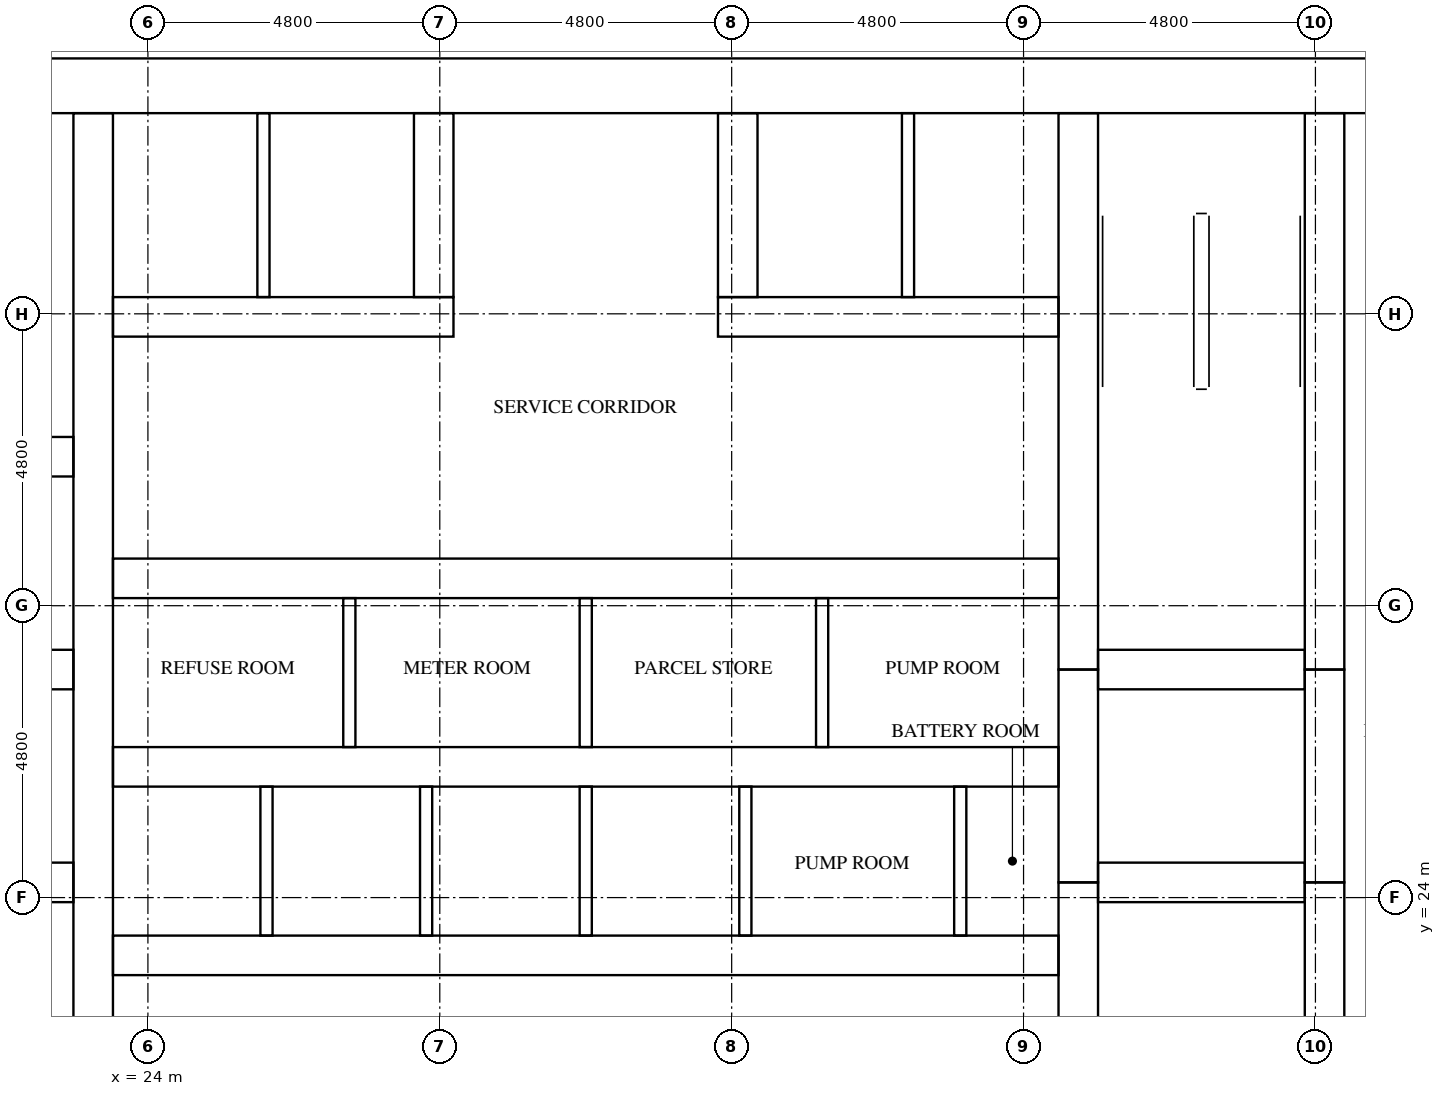
"""IFC4 building model, lengths in metres.
Left out: names, types, materials, properties, quantities, classifications, styles, units other than length and angle.
Written with IfcOpenShell. Run it as: python <this file> out.ifc"""

import sys

from ifc_helpers import new_model, si_unit, direction, frame, frame_2d, origin, place, context, subcontext, project, spatial, rectangle, extrude, element, fill, save


model = new_model("IFC4")
c1 = context("Model", 3, precision=1e-05, world=origin(), true_north=direction((0.0, 1.0)))
c2 = subcontext(c1, "Body", "Model", "MODEL_VIEW")
j1 = project(units=[si_unit("LENGTHUNIT", "METRE"), si_unit("PLANEANGLEUNIT", "RADIAN")], contexts=[c1])
p1 = place(None, origin())
s1 = spatial("IfcSite", under=j1, at=p1, CompositionType="ELEMENT")
p2 = place(p1, origin())
s2 = spatial("IfcBuilding", under=s1, at=p2, CompositionType="ELEMENT")
p3 = place(p2, frame((0.0, 0.0, 69.8)))
s3 = spatial("IfcBuildingStorey", under=s2, at=p3, CompositionType="ELEMENT", Elevation=69.8)
p4 = place(p3, frame((15.0, 37.35, 0.0), z_axis=(0.0, 0.0, 1.0), x_axis=(1.0, 0.0, 0.0)))
e1 = element("IfcWall", 1, at=p4, inside=s3, PredefinedType="SHEAR", context=c2, shape_type="SweptSolid", body=[
    extrude(rectangle(XDim=32.4, YDim=0.9, at=frame_2d((16.2, 0.0))), origin(), (0.0, 0.0, 1.0), 3.2),
])
p5 = place(p4, frame((15.3, 0.0, 0.0)))
e2 = element("IfcOpeningElement", 2, at=p5, cuts=e1, PredefinedType="OPENING", context=c2, shape_type="SweptSolid", body=[
    extrude(rectangle(XDim=1.8, YDim=2.1, at=frame_2d((0.9, 1.05))), frame((0.0, 0.46, 0.0), z_axis=(0.0, -1.0, 0.0), x_axis=(1.0, 0.0, 0.0)), (0.0, 0.0, 1.0), 0.92),
])
p6 = place(p4, frame((1.794, 0.0, 0.0)))
e3 = element("IfcOpeningElement", 3, at=p6, cuts=e1, PredefinedType="OPENING", context=c2, shape_type="SweptSolid", body=[
    extrude(rectangle(XDim=1.0, YDim=2.1, at=frame_2d((0.5, 1.05))), frame((0.0, 0.46, 0.0), z_axis=(0.0, -1.0, 0.0), x_axis=(1.0, 0.0, 0.0)), (0.0, 0.0, 1.0), 0.92),
])
p7 = place(p4, frame((5.331, 0.0, 0.0)))
e4 = element("IfcOpeningElement", 4, at=p7, cuts=e1, PredefinedType="OPENING", context=c2, shape_type="SweptSolid", body=[
    extrude(rectangle(XDim=1.0, YDim=2.1, at=frame_2d((0.5, 1.05))), frame((0.0, 0.46, 0.0), z_axis=(0.0, -1.0, 0.0), x_axis=(1.0, 0.0, 0.0)), (0.0, 0.0, 1.0), 0.92),
])
p8 = place(p3, frame((23.1, 15.9, 0.0), z_axis=(0.0, 0.0, 1.0), x_axis=(0.0, 1.0, 0.0)))
e5 = element("IfcWall", 5, at=p8, inside=s3, PredefinedType="SHEAR", context=c2, shape_type="SweptSolid", body=[
    extrude(rectangle(XDim=21.0, YDim=0.65, at=frame_2d((10.5, 0.0))), origin(), (0.0, 0.0, 1.0), 3.2),
])
p9 = place(p3, frame((39.3, 15.9, 0.0), z_axis=(0.0, 0.0, 1.0), x_axis=(0.0, 1.0, 0.0)))
e6 = element("IfcWall", 6, at=p9, inside=s3, PredefinedType="SHEAR", context=c2, shape_type="SweptSolid", body=[
    extrude(rectangle(XDim=8.35, YDim=0.65, at=frame_2d((4.175, 0.0))), origin(), (0.0, 0.0, 1.0), 3.2),
])
p10 = place(p3, frame((39.3, 24.25, 0.0), z_axis=(0.0, 0.0, 1.0), x_axis=(0.0, 1.0, 0.0)))
e7 = element("IfcWall", 7, at=p10, inside=s3, PredefinedType="SHEAR", context=c2, shape_type="SweptSolid", body=[
    extrude(rectangle(XDim=3.5, YDim=0.65, at=frame_2d((1.75, 0.0))), origin(), (0.0, 0.0, 1.0), 3.2),
])
p11 = place(p3, frame((39.3, 27.75, 0.0), z_axis=(0.0, 0.0, 1.0), x_axis=(0.0, 1.0, 0.0)))
e8 = element("IfcWall", 8, at=p11, inside=s3, PredefinedType="SHEAR", context=c2, shape_type="SweptSolid", body=[
    extrude(rectangle(XDim=9.15, YDim=0.65, at=frame_2d((4.575, 0.0))), origin(), (0.0, 0.0, 1.0), 3.2),
])
p12 = place(p3, frame((43.35, 15.9, 0.0), z_axis=(0.0, 0.0, 1.0), x_axis=(0.0, 1.0, 0.0)))
e9 = element("IfcWall", 9, at=p12, inside=s3, PredefinedType="SHEAR", context=c2, shape_type="SweptSolid", body=[
    extrude(rectangle(XDim=8.35, YDim=0.65, at=frame_2d((4.175, 0.0))), origin(), (0.0, 0.0, 1.0), 3.2),
])
p13 = place(p12, frame((0.3, 0.0, 0.0)))
e10 = element("IfcOpeningElement", 10, at=p13, cuts=e9, PredefinedType="OPENING", context=c2, shape_type="SweptSolid", body=[
    extrude(rectangle(XDim=1.2, YDim=2.1, at=frame_2d((0.6, 1.05))), frame((0.0, 0.335, 0.0), z_axis=(0.0, -1.0, 0.0), x_axis=(1.0, 0.0, 0.0)), (0.0, 0.0, 1.0), 0.67),
])
p14 = place(p3, frame((43.35, 24.25, 0.0), z_axis=(0.0, 0.0, 1.0), x_axis=(0.0, 1.0, 0.0)))
e11 = element("IfcWall", 11, at=p14, inside=s3, PredefinedType="SHEAR", context=c2, shape_type="SweptSolid", body=[
    extrude(rectangle(XDim=3.5, YDim=0.65, at=frame_2d((1.75, 0.0))), origin(), (0.0, 0.0, 1.0), 3.2),
])
p15 = place(p14, frame((1.2, 0.0, 0.0)))
e12 = element("IfcOpeningElement", 12, at=p15, cuts=e11, PredefinedType="OPENING", context=c2, shape_type="SweptSolid", body=[
    extrude(rectangle(XDim=1.1, YDim=2.1, at=frame_2d((0.55, 1.05))), frame((0.0, 0.335, 0.0), z_axis=(0.0, -1.0, 0.0), x_axis=(1.0, 0.0, 0.0)), (0.0, 0.0, 1.0), 0.67),
])
p16 = place(p3, frame((43.35, 27.75, 0.0), z_axis=(0.0, 0.0, 1.0), x_axis=(0.0, 1.0, 0.0)))
e13 = element("IfcWall", 13, at=p16, inside=s3, PredefinedType="SHEAR", context=c2, shape_type="SweptSolid", body=[
    extrude(rectangle(XDim=9.15, YDim=0.65, at=frame_2d((4.575, 0.0))), origin(), (0.0, 0.0, 1.0), 3.2),
])
p17 = place(p16, frame((7.65, 0.0, 0.0)))
e14 = element("IfcOpeningElement", 14, at=p17, cuts=e13, PredefinedType="OPENING", context=c2, shape_type="SweptSolid", body=[
    extrude(rectangle(XDim=1.2, YDim=2.1, at=frame_2d((0.6, 1.05))), frame((0.0, 0.335, 0.0), z_axis=(0.0, -1.0, 0.0), x_axis=(1.0, 0.0, 0.0)), (0.0, 0.0, 1.0), 0.67),
])
for number, where, z_axis, x_axis in (
    (15, (19.375, 24.25, 0.0), (0.0, 0.0, 1.0), (1.0, 0.0, 0.0)),
    (16, (19.375, 27.75, 0.0), (0.0, 0.0, 1.0), (1.0, 0.0, 0.0)),
):
    element("IfcWall", number, at=place(p3, frame(where, z_axis=z_axis, x_axis=x_axis)), inside=s3, PredefinedType="SHEAR", context=c2, shape_type="SweptSolid", body=[
        extrude(rectangle(XDim=3.4, YDim=0.65, at=frame_2d((1.7, 0.0))), origin(), (0.0, 0.0, 1.0), 3.2),
    ])
p18 = place(p3, frame((15.9, 31.25, 0.0), z_axis=(0.0, 0.0, 1.0), x_axis=(1.0, 0.0, 0.0)))
e17 = element("IfcWall", 17, at=p18, inside=s3, PredefinedType="SHEAR", context=c2, shape_type="SweptSolid", body=[
    extrude(rectangle(XDim=6.875, YDim=0.65, at=frame_2d((3.438, 0.0))), origin(), (0.0, 0.0, 1.0), 3.2),
])
for number, where, z_axis, x_axis in (
    (18, (39.625, 24.25, 0.0), (0.0, 0.0, 1.0), (1.0, 0.0, 0.0)),
    (19, (39.625, 27.75, 0.0), (0.0, 0.0, 1.0), (1.0, 0.0, 0.0)),
):
    element("IfcWall", number, at=place(p3, frame(where, z_axis=z_axis, x_axis=x_axis)), inside=s3, PredefinedType="SHEAR", context=c2, shape_type="SweptSolid", body=[
        extrude(rectangle(XDim=3.4, YDim=0.65, at=frame_2d((1.7, 0.0))), origin(), (0.0, 0.0, 1.0), 3.2),
    ])
p19 = place(p3, frame((23.425, 23.05, 0.0), z_axis=(0.0, 0.0, 1.0), x_axis=(1.0, 0.0, 0.0)))
e20 = element("IfcWall", 20, at=p19, inside=s3, PredefinedType="SHEAR", context=c2, shape_type="SweptSolid", body=[
    extrude(rectangle(XDim=15.55, YDim=0.65, at=frame_2d((7.775, 0.0))), origin(), (0.0, 0.0, 1.0), 3.2),
])
p20 = place(p19, frame((0.663, 0.0, 0.0)))
e21 = element("IfcOpeningElement", 21, at=p20, cuts=e20, PredefinedType="OPENING", context=c2, shape_type="SweptSolid", body=[
    extrude(rectangle(XDim=1.1, YDim=2.1, at=frame_2d((0.55, 1.05))), frame((0.0, 0.335, 0.0), z_axis=(0.0, -1.0, 0.0), x_axis=(1.0, 0.0, 0.0)), (0.0, 0.0, 1.0), 0.67),
])
p21 = place(p19, frame((3.288, 0.0, 0.0)))
e22 = element("IfcOpeningElement", 22, at=p21, cuts=e20, PredefinedType="OPENING", context=c2, shape_type="SweptSolid", body=[
    extrude(rectangle(XDim=1.1, YDim=2.1, at=frame_2d((0.55, 1.05))), frame((0.0, 0.335, 0.0), z_axis=(0.0, -1.0, 0.0), x_axis=(1.0, 0.0, 0.0)), (0.0, 0.0, 1.0), 0.67),
])
p22 = place(p19, frame((11.667, 0.0, 0.0)))
e23 = element("IfcOpeningElement", 23, at=p22, cuts=e20, PredefinedType="OPENING", context=c2, shape_type="SweptSolid", body=[
    extrude(rectangle(XDim=1.0, YDim=2.1, at=frame_2d((0.5, 1.05))), frame((0.0, 0.335, 0.0), z_axis=(0.0, -1.0, 0.0), x_axis=(1.0, 0.0, 0.0)), (0.0, 0.0, 1.0), 0.67),
])
p23 = place(p19, frame((14.292, 0.0, 0.0)))
e24 = element("IfcOpeningElement", 24, at=p23, cuts=e20, PredefinedType="OPENING", context=c2, shape_type="SweptSolid", body=[
    extrude(rectangle(XDim=1.0, YDim=2.1, at=frame_2d((0.5, 1.05))), frame((0.0, 0.335, 0.0), z_axis=(0.0, -1.0, 0.0), x_axis=(1.0, 0.0, 0.0)), (0.0, 0.0, 1.0), 0.67),
])
p24 = place(p3, frame((23.425, 26.15, 0.0), z_axis=(0.0, 0.0, 1.0), x_axis=(1.0, 0.0, 0.0)))
e25 = element("IfcWall", 25, at=p24, inside=s3, PredefinedType="SHEAR", context=c2, shape_type="SweptSolid", body=[
    extrude(rectangle(XDim=15.55, YDim=0.65, at=frame_2d((7.775, 0.0))), origin(), (0.0, 0.0, 1.0), 3.2),
])
p25 = place(p3, frame((23.425, 29.25, 0.0), z_axis=(0.0, 0.0, 1.0), x_axis=(1.0, 0.0, 0.0)))
e26 = element("IfcWall", 26, at=p25, inside=s3, PredefinedType="SHEAR", context=c2, shape_type="SweptSolid", body=[
    extrude(rectangle(XDim=15.55, YDim=0.65, at=frame_2d((7.775, 0.0))), origin(), (0.0, 0.0, 1.0), 3.2),
])
p26 = place(p25, frame((1.394, 0.0, 0.0)))
e27 = element("IfcOpeningElement", 27, at=p26, cuts=e26, PredefinedType="OPENING", context=c2, shape_type="SweptSolid", body=[
    extrude(rectangle(XDim=1.0, YDim=2.1, at=frame_2d((0.5, 1.05))), frame((0.0, 0.335, 0.0), z_axis=(0.0, -1.0, 0.0), x_axis=(1.0, 0.0, 0.0)), (0.0, 0.0, 1.0), 0.67),
])
p27 = place(p25, frame((5.331, 0.0, 0.0)))
e28 = element("IfcOpeningElement", 28, at=p27, cuts=e26, PredefinedType="OPENING", context=c2, shape_type="SweptSolid", body=[
    extrude(rectangle(XDim=1.0, YDim=2.1, at=frame_2d((0.5, 1.05))), frame((0.0, 0.335, 0.0), z_axis=(0.0, -1.0, 0.0), x_axis=(1.0, 0.0, 0.0)), (0.0, 0.0, 1.0), 0.67),
])
p28 = place(p25, frame((9.219, 0.0, 0.0)))
e29 = element("IfcOpeningElement", 29, at=p28, cuts=e26, PredefinedType="OPENING", context=c2, shape_type="SweptSolid", body=[
    extrude(rectangle(XDim=1.0, YDim=2.1, at=frame_2d((0.5, 1.05))), frame((0.0, 0.335, 0.0), z_axis=(0.0, -1.0, 0.0), x_axis=(1.0, 0.0, 0.0)), (0.0, 0.0, 1.0), 0.67),
])
p29 = place(p25, frame((13.156, 0.0, 0.0)))
e30 = element("IfcOpeningElement", 30, at=p29, cuts=e26, PredefinedType="OPENING", context=c2, shape_type="SweptSolid", body=[
    extrude(rectangle(XDim=1.0, YDim=2.1, at=frame_2d((0.5, 1.05))), frame((0.0, 0.335, 0.0), z_axis=(0.0, -1.0, 0.0), x_axis=(1.0, 0.0, 0.0)), (0.0, 0.0, 1.0), 0.67),
])
p30 = place(p3, frame((23.425, 33.55, 0.0), z_axis=(0.0, 0.0, 1.0), x_axis=(1.0, 0.0, 0.0)))
e31 = element("IfcWall", 31, at=p30, inside=s3, PredefinedType="SHEAR", context=c2, shape_type="SweptSolid", body=[
    extrude(rectangle(XDim=5.6, YDim=0.65, at=frame_2d((2.8, 0.0))), origin(), (0.0, 0.0, 1.0), 3.2),
])
p31 = place(p3, frame((33.375, 33.55, 0.0), z_axis=(0.0, 0.0, 1.0), x_axis=(1.0, 0.0, 0.0)))
e32 = element("IfcWall", 32, at=p31, inside=s3, PredefinedType="SHEAR", context=c2, shape_type="SweptSolid", body=[
    extrude(rectangle(XDim=5.6, YDim=0.65, at=frame_2d((2.8, 0.0))), origin(), (0.0, 0.0, 1.0), 3.2),
])
for number, where, z_axis, x_axis in (
    (33, (28.7, 33.875, 0.0), (0.0, 0.0, 1.0), (0.0, 1.0, 0.0)),
    (34, (33.7, 33.875, 0.0), (0.0, 0.0, 1.0), (0.0, 1.0, 0.0)),
):
    element("IfcWall", number, at=place(p3, frame(where, z_axis=z_axis, x_axis=x_axis)), inside=s3, PredefinedType="SHEAR", context=c2, shape_type="SweptSolid", body=[
        extrude(rectangle(XDim=3.025, YDim=0.65, at=frame_2d((1.512, 0.0))), origin(), (0.0, 0.0, 1.0), 3.2),
    ])
for number, where, z_axis, x_axis in (
    (35, (25.95, 23.375, 0.0), (0.0, 0.0, 1.0), (0.0, 1.0, 0.0)),
    (36, (28.575, 23.375, 0.0), (0.0, 0.0, 1.0), (0.0, 1.0, 0.0)),
    (37, (31.2, 23.375, 0.0), (0.0, 0.0, 1.0), (0.0, 1.0, 0.0)),
    (38, (33.825, 23.375, 0.0), (0.0, 0.0, 1.0), (0.0, 1.0, 0.0)),
):
    element("IfcWall", number, at=place(p3, frame(where, z_axis=z_axis, x_axis=x_axis)), inside=s3, PredefinedType="SOLIDWALL", context=c2, shape_type="SweptSolid", body=[
        extrude(rectangle(XDim=2.45, YDim=0.2, at=frame_2d((1.225, 0.0))), origin(), (0.0, 0.0, 1.0), 3.2),
    ])
for number, where, z_axis, x_axis in (
    (39, (25.9, 33.875, 0.0), (0.0, 0.0, 1.0), (0.0, 1.0, 0.0)),
    (40, (36.5, 33.875, 0.0), (0.0, 0.0, 1.0), (0.0, 1.0, 0.0)),
):
    element("IfcWall", number, at=place(p3, frame(where, z_axis=z_axis, x_axis=x_axis)), inside=s3, PredefinedType="SOLIDWALL", context=c2, shape_type="SweptSolid", body=[
        extrude(rectangle(XDim=3.025, YDim=0.2, at=frame_2d((1.512, 0.0))), origin(), (0.0, 0.0, 1.0), 3.2),
    ])
for number, where, z_axis, x_axis in (
    (41, (37.359, 23.375, 0.0), (0.0, 0.0, 1.0), (0.0, 1.0, 0.0)),
    (42, (27.312, 26.475, 0.0), (0.0, 0.0, 1.0), (0.0, 1.0, 0.0)),
    (43, (31.2, 26.475, 0.0), (0.0, 0.0, 1.0), (0.0, 1.0, 0.0)),
    (44, (35.087, 26.475, 0.0), (0.0, 0.0, 1.0), (0.0, 1.0, 0.0)),
):
    element("IfcWall", number, at=place(p3, frame(where, z_axis=z_axis, x_axis=x_axis)), inside=s3, PredefinedType="PARTITIONING", context=c2, shape_type="SweptSolid", body=[
        extrude(rectangle(XDim=2.45, YDim=0.2, at=frame_2d((1.225, 0.0))), origin(), (0.0, 0.0, 1.0), 3.2),
    ])
p32 = place(p20, origin())
e45 = element("IfcDoor", 45, at=p32, inside=s3, OperationType="DOUBLE_DOOR_SLIDING", PredefinedType="DOOR", context=c2, shape_type="SweptSolid", body=[
    extrude(rectangle(XDim=1.1, YDim=2.1, at=frame_2d((0.55, 1.05))), frame((0.0, 0.025, 0.0), z_axis=(0.0, -1.0, 0.0), x_axis=(1.0, 0.0, 0.0)), (0.0, 0.0, 1.0), 0.05),
])
fill(e21, e45)
p33 = place(p21, origin())
e46 = element("IfcDoor", 46, at=p33, inside=s3, OperationType="DOUBLE_DOOR_SLIDING", PredefinedType="DOOR", context=c2, shape_type="SweptSolid", body=[
    extrude(rectangle(XDim=1.1, YDim=2.1, at=frame_2d((0.55, 1.05))), frame((0.0, 0.025, 0.0), z_axis=(0.0, -1.0, 0.0), x_axis=(1.0, 0.0, 0.0)), (0.0, 0.0, 1.0), 0.05),
])
fill(e22, e46)
p34 = place(p15, origin())
e47 = element("IfcDoor", 47, at=p34, inside=s3, OperationType="DOUBLE_DOOR_SLIDING", PredefinedType="DOOR", context=c2, shape_type="SweptSolid", body=[
    extrude(rectangle(XDim=1.1, YDim=2.1, at=frame_2d((0.55, 1.05))), frame((0.0, 0.025, 0.0), z_axis=(0.0, -1.0, 0.0), x_axis=(1.0, 0.0, 0.0)), (0.0, 0.0, 1.0), 0.05),
])
fill(e12, e47)
p35 = place(p17, origin())
e48 = element("IfcDoor", 48, at=p35, inside=s3, OperationType="SINGLE_SWING_LEFT", PredefinedType="DOOR", context=c2, shape_type="SweptSolid", body=[
    extrude(rectangle(XDim=1.2, YDim=2.1, at=frame_2d((0.6, 1.05))), frame((0.0, 0.025, 0.0), z_axis=(0.0, -1.0, 0.0), x_axis=(1.0, 0.0, 0.0)), (0.0, 0.0, 1.0), 0.05),
])
fill(e14, e48)
p36 = place(p5, origin())
e49 = element("IfcDoor", 49, at=p36, inside=s3, OperationType="DOUBLE_DOOR_SINGLE_SWING", PredefinedType="DOOR", context=c2, shape_type="SweptSolid", body=[
    extrude(rectangle(XDim=1.8, YDim=2.1, at=frame_2d((0.9, 1.05))), frame((0.0, 0.025, 0.0), z_axis=(0.0, -1.0, 0.0), x_axis=(1.0, 0.0, 0.0)), (0.0, 0.0, 1.0), 0.05),
])
fill(e2, e49)
p37 = place(p22, frame((1.0, 0.0, 0.0), z_axis=(0.0, 0.0, 1.0), x_axis=(-1.0, 0.0, 0.0)))
e50 = element("IfcDoor", 50, at=p37, inside=s3, OperationType="SINGLE_SWING_RIGHT", PredefinedType="DOOR", context=c2, shape_type="SweptSolid", body=[
    extrude(rectangle(XDim=1.0, YDim=2.1, at=frame_2d((0.5, 1.05))), frame((0.0, 0.025, 0.0), z_axis=(0.0, -1.0, 0.0), x_axis=(1.0, 0.0, 0.0)), (0.0, 0.0, 1.0), 0.05),
])
fill(e23, e50)
p38 = place(p23, frame((1.0, 0.0, 0.0), z_axis=(0.0, 0.0, 1.0), x_axis=(-1.0, 0.0, 0.0)))
e51 = element("IfcDoor", 51, at=p38, inside=s3, OperationType="SINGLE_SWING_LEFT", PredefinedType="DOOR", context=c2, shape_type="SweptSolid", body=[
    extrude(rectangle(XDim=1.0, YDim=2.1, at=frame_2d((0.5, 1.05))), frame((0.0, 0.025, 0.0), z_axis=(0.0, -1.0, 0.0), x_axis=(1.0, 0.0, 0.0)), (0.0, 0.0, 1.0), 0.05),
])
fill(e24, e51)
p39 = place(p26, origin())
e52 = element("IfcDoor", 52, at=p39, inside=s3, OperationType="SINGLE_SWING_RIGHT", PredefinedType="DOOR", context=c2, shape_type="SweptSolid", body=[
    extrude(rectangle(XDim=1.0, YDim=2.1, at=frame_2d((0.5, 1.05))), frame((0.0, 0.025, 0.0), z_axis=(0.0, -1.0, 0.0), x_axis=(1.0, 0.0, 0.0)), (0.0, 0.0, 1.0), 0.05),
])
fill(e27, e52)
p40 = place(p27, origin())
e53 = element("IfcDoor", 53, at=p40, inside=s3, OperationType="SINGLE_SWING_LEFT", PredefinedType="DOOR", context=c2, shape_type="SweptSolid", body=[
    extrude(rectangle(XDim=1.0, YDim=2.1, at=frame_2d((0.5, 1.05))), frame((0.0, 0.025, 0.0), z_axis=(0.0, -1.0, 0.0), x_axis=(1.0, 0.0, 0.0)), (0.0, 0.0, 1.0), 0.05),
])
fill(e28, e53)
p41 = place(p28, origin())
e54 = element("IfcDoor", 54, at=p41, inside=s3, OperationType="SINGLE_SWING_RIGHT", PredefinedType="DOOR", context=c2, shape_type="SweptSolid", body=[
    extrude(rectangle(XDim=1.0, YDim=2.1, at=frame_2d((0.5, 1.05))), frame((0.0, 0.025, 0.0), z_axis=(0.0, -1.0, 0.0), x_axis=(1.0, 0.0, 0.0)), (0.0, 0.0, 1.0), 0.05),
])
fill(e29, e54)
p42 = place(p29, origin())
e55 = element("IfcDoor", 55, at=p42, inside=s3, OperationType="SINGLE_SWING_LEFT", PredefinedType="DOOR", context=c2, shape_type="SweptSolid", body=[
    extrude(rectangle(XDim=1.0, YDim=2.1, at=frame_2d((0.5, 1.05))), frame((0.0, 0.025, 0.0), z_axis=(0.0, -1.0, 0.0), x_axis=(1.0, 0.0, 0.0)), (0.0, 0.0, 1.0), 0.05),
])
fill(e30, e55)
save(model, sys.argv[1])
